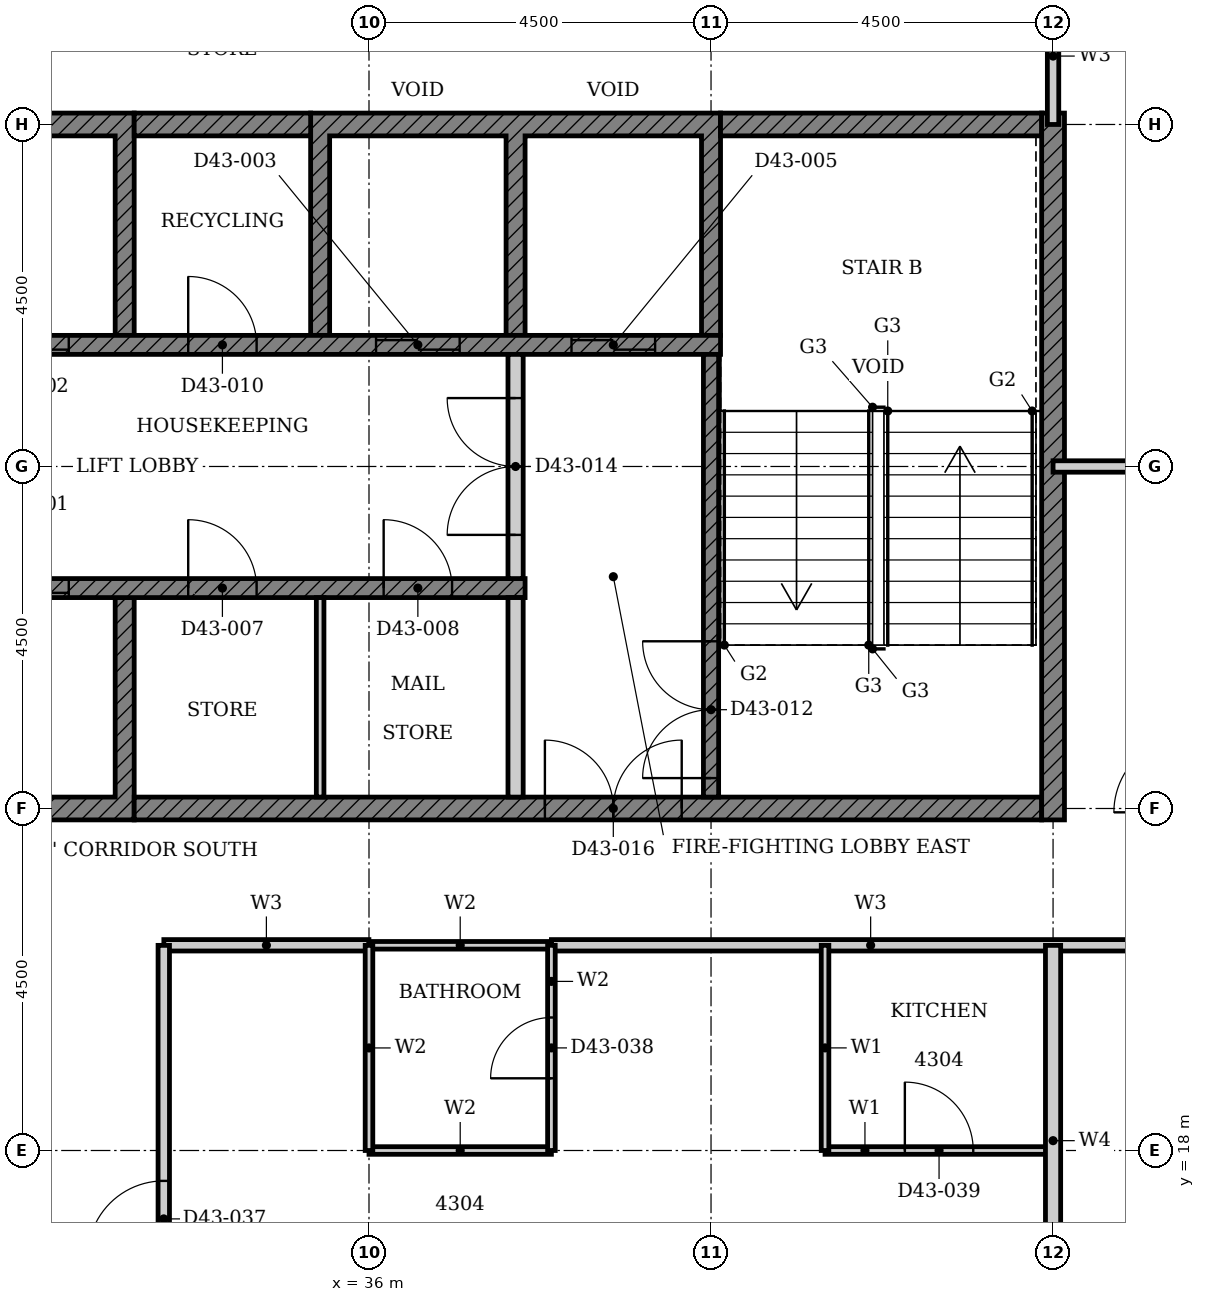
"""IFC4 building model, lengths in metres.
Left out: names, types, materials, properties, quantities, classifications, styles, units other than length and angle.
Written with IfcOpenShell. Run it as: python <this file> out.ifc"""

import sys

from ifc_helpers import new_model, si_unit, direction, frame, frame_2d, origin, place, context, subcontext, project, spatial, polyline, rectangle, outline, extrude, element, fill, save


model = new_model("IFC4")
c1 = context("Model", 3, precision=1e-05, world=origin(), true_north=direction((0.0, 1.0)))
c2 = subcontext(c1, "Body", "Model", "MODEL_VIEW")
j1 = project(units=[si_unit("LENGTHUNIT", "METRE"), si_unit("PLANEANGLEUNIT", "RADIAN")], contexts=[c1])
p1 = place(None, origin())
s1 = spatial("IfcSite", under=j1, at=p1, CompositionType="ELEMENT")
p2 = place(p1, origin())
s2 = spatial("IfcBuilding", under=s1, at=p2, CompositionType="ELEMENT")
p3 = place(p2, frame((0.0, 0.0, 172.8)))
s3 = spatial("IfcBuildingStorey", under=s2, at=p3, CompositionType="ELEMENT", Elevation=172.8)
p4 = place(p3, origin())
e1 = element("IfcWall", 1, at=p4, inside=s3, PredefinedType="SHEAR", context=c2, shape_type="SweptSolid", body=[
    extrude(outline(polyline([(27.518, 22.35), (32.911, 22.35), (32.911, 25.275), (32.661, 25.275), (32.661, 22.65), (30.339, 22.65), (30.339, 25.275), (30.089, 25.275), (30.089, 22.65), (27.768, 22.65), (27.768, 25.275), (27.518, 25.275), (27.518, 22.35)])), origin(), (0.0, 0.0, 1.0), 3.4),
])
p5 = place(p3, origin())
e2 = element("IfcWall", 2, at=p5, inside=s3, PredefinedType="SHEAR", context=c2, shape_type="SweptSolid", body=[
    extrude(outline(polyline([(27.518, 28.725), (27.768, 28.725), (27.768, 31.35), (30.089, 31.35), (30.089, 28.725), (30.339, 28.725), (30.339, 31.35), (32.661, 31.35), (32.661, 28.725), (32.911, 28.725), (32.911, 31.65), (27.518, 31.65), (27.518, 28.725)])), origin(), (0.0, 0.0, 1.0), 3.4),
])
p6 = place(p3, origin())
e3 = element("IfcWall", 3, at=p6, inside=s3, PredefinedType="SHEAR", context=c2, shape_type="SweptSolid", body=[
    extrude(outline(polyline([(35.232, 28.725), (35.482, 28.725), (35.482, 31.35), (37.803, 31.35), (37.803, 28.725), (38.053, 28.725), (38.053, 31.35), (40.375, 31.35), (40.375, 28.725), (40.625, 28.725), (40.625, 31.65), (35.232, 31.65), (35.232, 28.725)])), origin(), (0.0, 0.0, 1.0), 3.4),
])
p7 = place(p3, frame((32.911, 22.5, 0.0), z_axis=(0.0, 0.0, 1.0), x_axis=(1.0, 0.0, 0.0)))
e4 = element("IfcWall", 4, at=p7, inside=s3, PredefinedType="SHEAR", context=c2, shape_type="SweptSolid", body=[
    extrude(rectangle(XDim=11.939, YDim=0.3, at=frame_2d((5.97, 0.0))), origin(), (0.0, 0.0, 1.0), 3.4),
])
p8 = place(p7, frame((5.404, 0.0, 0.0)))
e5 = element("IfcOpeningElement", 5, at=p8, cuts=e4, PredefinedType="OPENING", context=c2, shape_type="SweptSolid", body=[
    extrude(rectangle(XDim=1.8, YDim=2.1, at=frame_2d((0.9, 1.05))), frame((0.0, 0.16, 0.0), z_axis=(0.0, -1.0, 0.0), x_axis=(1.0, 0.0, 0.0)), (0.0, 0.0, 1.0), 0.32),
])
p9 = place(p3, frame((32.911, 31.5, 0.0), z_axis=(0.0, 0.0, 1.0), x_axis=(1.0, 0.0, 0.0)))
e6 = element("IfcWall", 6, at=p9, inside=s3, PredefinedType="SHEAR", context=c2, shape_type="SweptSolid", body=[
    extrude(rectangle(XDim=2.322, YDim=0.3, at=frame_2d((1.161, 0.0))), origin(), (0.0, 0.0, 1.0), 3.4),
])
p10 = place(p3, frame((40.625, 31.5, 0.0), z_axis=(0.0, 0.0, 1.0), x_axis=(1.0, 0.0, 0.0)))
e7 = element("IfcWall", 7, at=p10, inside=s3, PredefinedType="SHEAR", context=c2, shape_type="SweptSolid", body=[
    extrude(rectangle(XDim=4.225, YDim=0.3, at=frame_2d((2.113, 0.0))), origin(), (0.0, 0.0, 1.0), 3.4),
])
p11 = place(p3, frame((45.0, 22.35, 0.0), z_axis=(0.0, 0.0, 1.0), x_axis=(0.0, 1.0, 0.0)))
e8 = element("IfcWall", 8, at=p11, inside=s3, PredefinedType="SHEAR", context=c2, shape_type="SweptSolid", body=[
    extrude(rectangle(XDim=9.3, YDim=0.3, at=frame_2d((4.65, 0.0))), origin(), (0.0, 0.0, 1.0), 3.4),
])
p12 = place(p3, frame((22.375, 25.4, 0.0), z_axis=(0.0, 0.0, 1.0), x_axis=(1.0, 0.0, 0.0)))
e9 = element("IfcWall", 9, at=p12, inside=s3, PredefinedType="SHEAR", context=c2, shape_type="SweptSolid", body=[
    extrude(rectangle(XDim=15.678, YDim=0.25, at=frame_2d((7.839, 0.0))), origin(), (0.0, 0.0, 1.0), 3.4),
])
p13 = place(p12, frame((8.575, 0.0, 0.0)))
e10 = element("IfcOpeningElement", 10, at=p13, cuts=e9, PredefinedType="OPENING", context=c2, shape_type="SweptSolid", body=[
    extrude(rectangle(XDim=1.1, YDim=2.1, at=frame_2d((0.55, 1.05))), frame((0.0, 0.135, 0.0), z_axis=(0.0, -1.0, 0.0), x_axis=(1.0, 0.0, 0.0)), (0.0, 0.0, 1.0), 0.27),
])
p14 = place(p12, frame((0.861, 0.0, 0.0)))
e11 = element("IfcOpeningElement", 11, at=p14, cuts=e9, PredefinedType="OPENING", context=c2, shape_type="SweptSolid", body=[
    extrude(rectangle(XDim=1.1, YDim=2.1, at=frame_2d((0.55, 1.05))), frame((0.0, 0.135, 0.0), z_axis=(0.0, -1.0, 0.0), x_axis=(1.0, 0.0, 0.0)), (0.0, 0.0, 1.0), 0.27),
])
p15 = place(p12, frame((3.532, 0.0, 0.0)))
e12 = element("IfcOpeningElement", 12, at=p15, cuts=e9, PredefinedType="OPENING", context=c2, shape_type="SweptSolid", body=[
    extrude(rectangle(XDim=0.9, YDim=2.1, at=frame_2d((0.45, 1.05))), frame((0.0, 0.135, 0.0), z_axis=(0.0, -1.0, 0.0), x_axis=(1.0, 0.0, 0.0)), (0.0, 0.0, 1.0), 0.27),
])
p16 = place(p12, frame((11.246, 0.0, 0.0)))
e13 = element("IfcOpeningElement", 13, at=p16, cuts=e9, PredefinedType="OPENING", context=c2, shape_type="SweptSolid", body=[
    extrude(rectangle(XDim=0.9, YDim=2.1, at=frame_2d((0.45, 1.05))), frame((0.0, 0.135, 0.0), z_axis=(0.0, -1.0, 0.0), x_axis=(1.0, 0.0, 0.0)), (0.0, 0.0, 1.0), 0.27),
])
p17 = place(p12, frame((13.818, 0.0, 0.0)))
e14 = element("IfcOpeningElement", 14, at=p17, cuts=e9, PredefinedType="OPENING", context=c2, shape_type="SweptSolid", body=[
    extrude(rectangle(XDim=0.9, YDim=2.1, at=frame_2d((0.45, 1.05))), frame((0.0, 0.135, 0.0), z_axis=(0.0, -1.0, 0.0), x_axis=(1.0, 0.0, 0.0)), (0.0, 0.0, 1.0), 0.27),
])
p18 = place(p3, frame((24.947, 28.6, 0.0), z_axis=(0.0, 0.0, 1.0), x_axis=(1.0, 0.0, 0.0)))
e15 = element("IfcWall", 15, at=p18, inside=s3, PredefinedType="SHEAR", context=c2, shape_type="SweptSolid", body=[
    extrude(rectangle(XDim=15.678, YDim=0.25, at=frame_2d((7.839, 0.0))), origin(), (0.0, 0.0, 1.0), 3.4),
])
p19 = place(p18, frame((6.004, 0.0, 0.0)))
e16 = element("IfcOpeningElement", 16, at=p19, cuts=e15, PredefinedType="OPENING", context=c2, shape_type="SweptSolid", body=[
    extrude(rectangle(XDim=1.1, YDim=2.1, at=frame_2d((0.55, 1.05))), frame((0.0, 0.135, 0.0), z_axis=(0.0, -1.0, 0.0), x_axis=(1.0, 0.0, 0.0)), (0.0, 0.0, 1.0), 0.27),
])
p20 = place(p18, frame((11.146, 0.0, 0.0)))
e17 = element("IfcOpeningElement", 17, at=p20, cuts=e15, PredefinedType="OPENING", context=c2, shape_type="SweptSolid", body=[
    extrude(rectangle(XDim=1.1, YDim=2.1, at=frame_2d((0.55, 1.05))), frame((0.0, 0.135, 0.0), z_axis=(0.0, -1.0, 0.0), x_axis=(1.0, 0.0, 0.0)), (0.0, 0.0, 1.0), 0.27),
])
p21 = place(p18, frame((13.718, 0.0, 0.0)))
e18 = element("IfcOpeningElement", 18, at=p21, cuts=e15, PredefinedType="OPENING", context=c2, shape_type="SweptSolid", body=[
    extrude(rectangle(XDim=1.1, YDim=2.1, at=frame_2d((0.55, 1.05))), frame((0.0, 0.135, 0.0), z_axis=(0.0, -1.0, 0.0), x_axis=(1.0, 0.0, 0.0)), (0.0, 0.0, 1.0), 0.27),
])
p22 = place(p18, frame((0.961, 0.0, 0.0)))
e19 = element("IfcOpeningElement", 19, at=p22, cuts=e15, PredefinedType="OPENING", context=c2, shape_type="SweptSolid", body=[
    extrude(rectangle(XDim=0.9, YDim=2.1, at=frame_2d((0.45, 1.05))), frame((0.0, 0.135, 0.0), z_axis=(0.0, -1.0, 0.0), x_axis=(1.0, 0.0, 0.0)), (0.0, 0.0, 1.0), 0.27),
])
p23 = place(p18, frame((8.675, 0.0, 0.0)))
e20 = element("IfcOpeningElement", 20, at=p23, cuts=e15, PredefinedType="OPENING", context=c2, shape_type="SweptSolid", body=[
    extrude(rectangle(XDim=0.9, YDim=2.1, at=frame_2d((0.45, 1.05))), frame((0.0, 0.135, 0.0), z_axis=(0.0, -1.0, 0.0), x_axis=(1.0, 0.0, 0.0)), (0.0, 0.0, 1.0), 0.27),
])
p24 = place(p3, frame((37.928, 22.65, 0.0), z_axis=(0.0, 0.0, 1.0), x_axis=(0.0, 1.0, 0.0)))
e21 = element("IfcWall", 21, at=p24, inside=s3, PredefinedType="PARTITIONING", context=c2, shape_type="SweptSolid", body=[
    extrude(rectangle(XDim=2.625, YDim=0.2, at=frame_2d((1.312, 0.0))), origin(), (0.0, 0.0, 1.0), 3.4),
])
p25 = place(p3, frame((35.357, 22.65, 0.0), z_axis=(0.0, 0.0, 1.0), x_axis=(0.0, 1.0, 0.0)))
e22 = element("IfcWall", 22, at=p25, inside=s3, PredefinedType="PARTITIONING", context=c2, shape_type="SweptSolid", body=[
    extrude(rectangle(XDim=2.625, YDim=0.1, at=frame_2d((1.312, 0.0))), origin(), (0.0, 0.0, 1.0), 3.4),
])
p26 = place(p3, frame((40.5, 22.65, 0.0), z_axis=(0.0, 0.0, 1.0), x_axis=(0.0, 1.0, 0.0)))
e23 = element("IfcWall", 23, at=p26, inside=s3, PredefinedType="SHEAR", context=c2, shape_type="SweptSolid", body=[
    extrude(rectangle(XDim=5.825, YDim=0.2, at=frame_2d((2.913, 0.0))), origin(), (0.0, 0.0, 1.0), 3.4),
])
p27 = place(p26, frame((0.25, 0.0, 0.0)))
e24 = element("IfcOpeningElement", 24, at=p27, cuts=e23, PredefinedType="OPENING", context=c2, shape_type="SweptSolid", body=[
    extrude(rectangle(XDim=1.8, YDim=2.1, at=frame_2d((0.9, 1.05))), frame((0.0, 0.11, 0.0), z_axis=(0.0, -1.0, 0.0), x_axis=(1.0, 0.0, 0.0)), (0.0, 0.0, 1.0), 0.22),
])
p28 = place(p3, frame((37.928, 25.525, 0.0), z_axis=(0.0, 0.0, 1.0), x_axis=(0.0, 1.0, 0.0)))
e25 = element("IfcWall", 25, at=p28, inside=s3, PredefinedType="PARTITIONING", context=c2, shape_type="SweptSolid", body=[
    extrude(rectangle(XDim=2.95, YDim=0.2, at=frame_2d((1.475, 0.0))), origin(), (0.0, 0.0, 1.0), 3.4),
])
p29 = place(p28, frame((0.575, 0.0, 0.0)))
e26 = element("IfcOpeningElement", 26, at=p29, cuts=e25, PredefinedType="OPENING", context=c2, shape_type="SweptSolid", body=[
    extrude(rectangle(XDim=1.8, YDim=2.1, at=frame_2d((0.9, 1.05))), frame((0.0, 0.11, 0.0), z_axis=(0.0, -1.0, 0.0), x_axis=(1.0, 0.0, 0.0)), (0.0, 0.0, 1.0), 0.22),
])
p30 = place(p3, frame((33.301, 20.7, 0.0), z_axis=(0.0, 0.0, 1.0), x_axis=(1.0, 0.0, 0.0)))
e27 = element("IfcWall", 27, at=p30, inside=s3, PredefinedType="PARTITIONING", context=c2, shape_type="SweptSolid", body=[
    extrude(rectangle(XDim=2.698, YDim=0.15, at=frame_2d((1.349, 0.0))), origin(), (0.0, 0.0, 1.0), 3.4),
])
p31 = place(p3, frame((38.4, 20.7, 0.0), z_axis=(0.0, 0.0, 1.0), x_axis=(1.0, 0.0, 0.0)))
e28 = element("IfcWall", 28, at=p31, inside=s3, PredefinedType="PARTITIONING", context=c2, shape_type="SweptSolid", body=[
    extrude(rectangle(XDim=8.4, YDim=0.15, at=frame_2d((4.2, 0.0))), origin(), (0.0, 0.0, 1.0), 3.4),
])
p32 = place(p3, frame((45.0, 27.0, 0.0), z_axis=(0.0, 0.0, 1.0), x_axis=(1.0, 0.0, 0.0)))
e29 = element("IfcWall", 29, at=p32, inside=s3, PredefinedType="PARTITIONING", context=c2, shape_type="SweptSolid", body=[
    extrude(rectangle(XDim=13.5, YDim=0.15, at=frame_2d((6.75, 0.0))), origin(), (0.0, 0.0, 1.0), 2.68),
])
p33 = place(p32, frame((7.15, 0.0, 0.0)))
e30 = element("IfcOpeningElement", 30, at=p33, cuts=e29, PredefinedType="OPENING", context=c2, shape_type="SweptSolid", body=[
    extrude(rectangle(XDim=1.0, YDim=2.1, at=frame_2d((0.5, 1.05))), frame((0.0, 0.085, 0.0), z_axis=(0.0, -1.0, 0.0), x_axis=(1.0, 0.0, 0.0)), (0.0, 0.0, 1.0), 0.17),
])
p34 = place(p3, frame((33.3, 13.501, 0.0), z_axis=(0.0, 0.0, 1.0), x_axis=(0.0, 1.0, 0.0)))
e31 = element("IfcWall", 31, at=p34, inside=s3, PredefinedType="PARTITIONING", context=c2, shape_type="SweptSolid", body=[
    extrude(rectangle(XDim=7.198, YDim=0.15, at=frame_2d((3.599, 0.0))), origin(), (0.0, 0.0, 1.0), 3.4),
])
p35 = place(p34, frame((3.099, 0.0, 0.0)))
e32 = element("IfcOpeningElement", 32, at=p35, cuts=e31, PredefinedType="OPENING", context=c2, shape_type="SweptSolid", body=[
    extrude(rectangle(XDim=1.0, YDim=2.2, at=frame_2d((0.5, 1.1))), frame((0.0, 0.085, 0.0), z_axis=(0.0, -1.0, 0.0), x_axis=(1.0, 0.0, 0.0)), (0.0, 0.0, 1.0), 0.17),
])
p36 = place(p3, frame((45.0, 31.5, 0.0), z_axis=(0.0, 0.0, 1.0), x_axis=(0.0, 1.0, 0.0)))
e33 = element("IfcWall", 33, at=p36, inside=s3, PredefinedType="PARTITIONING", context=c2, shape_type="SweptSolid", body=[
    extrude(rectangle(XDim=1.8, YDim=0.15, at=frame_2d((0.9, 0.0))), origin(), (0.0, 0.0, 1.0), 3.4),
])
p37 = place(p3, frame((42.0, 18.0, 0.0), z_axis=(0.0, 0.0, 1.0), x_axis=(1.0, 0.0, 0.0)))
e34 = element("IfcWall", 34, at=p37, inside=s3, PredefinedType="PARTITIONING", context=c2, shape_type="SweptSolid", body=[
    extrude(rectangle(XDim=3.0, YDim=0.1, at=frame_2d((1.5, 0.0))), origin(), (0.0, 0.0, 1.0), 3.4),
])
p38 = place(p37, frame((1.05, 0.0, 0.0)))
e35 = element("IfcOpeningElement", 35, at=p38, cuts=e34, PredefinedType="OPENING", context=c2, shape_type="SweptSolid", body=[
    extrude(rectangle(XDim=0.9, YDim=2.1, at=frame_2d((0.45, 1.05))), frame((0.0, 0.06, 0.0), z_axis=(0.0, -1.0, 0.0), x_axis=(1.0, 0.0, 0.0)), (0.0, 0.0, 1.0), 0.12),
])
p39 = place(p3, frame((42.0, 18.0, 0.0), z_axis=(0.0, 0.0, 1.0), x_axis=(0.0, 1.0, 0.0)))
e36 = element("IfcWall", 36, at=p39, inside=s3, PredefinedType="PARTITIONING", context=c2, shape_type="SweptSolid", body=[
    extrude(rectangle(XDim=2.7, YDim=0.1, at=frame_2d((1.35, 0.0))), origin(), (0.0, 0.0, 1.0), 3.4),
])
p40 = place(p3, frame((45.0, 15.56, 0.0), z_axis=(0.0, 0.0, 1.0), x_axis=(0.0, 1.0, 0.0)))
e37 = element("IfcWall", 37, at=p40, inside=s3, PredefinedType="PARTITIONING", context=c2, shape_type="SweptSolid", body=[
    extrude(rectangle(XDim=5.139, YDim=0.2, at=frame_2d((2.569, 0.0))), origin(), (0.0, 0.0, 1.0), 3.4),
])
for number, where, z_axis, x_axis in (
    (38, (36.0, 18.0, 0.0), (0.0, 0.0, 1.0), (1.0, 0.0, 0.0)),
    (39, (36.0, 20.7, 0.0), (0.0, 0.0, 1.0), (1.0, 0.0, 0.0)),
):
    element("IfcWall", number, at=place(p3, frame(where, z_axis=z_axis, x_axis=x_axis)), inside=s3, PredefinedType="PARTITIONING", context=c2, shape_type="SweptSolid", body=[
        extrude(rectangle(XDim=2.4, YDim=0.1, at=frame_2d((1.2, 0.0))), origin(), (0.0, 0.0, 1.0), 3.4),
    ])
p41 = place(p3, frame((36.0, 18.0, 0.0), z_axis=(0.0, 0.0, 1.0), x_axis=(0.0, 1.0, 0.0)))
e40 = element("IfcWall", 40, at=p41, inside=s3, PredefinedType="PARTITIONING", context=c2, shape_type="SweptSolid", body=[
    extrude(rectangle(XDim=2.699, YDim=0.1, at=frame_2d((1.35, 0.0))), origin(), (0.0, 0.0, 1.0), 3.4),
])
p42 = place(p3, frame((38.4, 18.0, 0.0), z_axis=(0.0, 0.0, 1.0), x_axis=(0.0, 1.0, 0.0)))
e41 = element("IfcWall", 41, at=p42, inside=s3, PredefinedType="PARTITIONING", context=c2, shape_type="SweptSolid", body=[
    extrude(rectangle(XDim=2.7, YDim=0.1, at=frame_2d((1.35, 0.0))), origin(), (0.0, 0.0, 1.0), 3.4),
])
p43 = place(p42, frame((0.95, 0.0, 0.0)))
e42 = element("IfcOpeningElement", 42, at=p43, cuts=e41, PredefinedType="OPENING", context=c2, shape_type="SweptSolid", body=[
    extrude(rectangle(XDim=0.8, YDim=2.1, at=frame_2d((0.4, 1.05))), frame((0.0, 0.06, 0.0), z_axis=(0.0, -1.0, 0.0), x_axis=(1.0, 0.0, 0.0)), (0.0, 0.0, 1.0), 0.12),
])
p44 = place(p13, origin())
e43 = element("IfcDoor", 43, at=p44, inside=s3, OperationType="DOUBLE_DOOR_SLIDING", PredefinedType="DOOR", context=c2, shape_type="SweptSolid", body=[
    extrude(rectangle(XDim=1.1, YDim=2.1, at=frame_2d((0.55, 1.05))), frame((0.0, 0.025, 0.0), z_axis=(0.0, -1.0, 0.0), x_axis=(1.0, 0.0, 0.0)), (0.0, 0.0, 1.0), 0.05),
])
fill(e10, e43)
p45 = place(p19, origin())
e44 = element("IfcDoor", 44, at=p45, inside=s3, OperationType="DOUBLE_DOOR_SLIDING", PredefinedType="DOOR", context=c2, shape_type="SweptSolid", body=[
    extrude(rectangle(XDim=1.1, YDim=2.1, at=frame_2d((0.55, 1.05))), frame((0.0, 0.025, 0.0), z_axis=(0.0, -1.0, 0.0), x_axis=(1.0, 0.0, 0.0)), (0.0, 0.0, 1.0), 0.05),
])
fill(e16, e44)
p46 = place(p20, origin())
e45 = element("IfcDoor", 45, at=p46, inside=s3, OperationType="DOUBLE_DOOR_SLIDING", PredefinedType="DOOR", context=c2, shape_type="SweptSolid", body=[
    extrude(rectangle(XDim=1.1, YDim=2.1, at=frame_2d((0.55, 1.05))), frame((0.0, 0.025, 0.0), z_axis=(0.0, -1.0, 0.0), x_axis=(1.0, 0.0, 0.0)), (0.0, 0.0, 1.0), 0.05),
])
fill(e17, e45)
p47 = place(p21, origin())
e46 = element("IfcDoor", 46, at=p47, inside=s3, OperationType="DOUBLE_DOOR_SLIDING", PredefinedType="DOOR", context=c2, shape_type="SweptSolid", body=[
    extrude(rectangle(XDim=1.1, YDim=2.1, at=frame_2d((0.55, 1.05))), frame((0.0, 0.025, 0.0), z_axis=(0.0, -1.0, 0.0), x_axis=(1.0, 0.0, 0.0)), (0.0, 0.0, 1.0), 0.05),
])
fill(e18, e46)
p48 = place(p16, origin())
e47 = element("IfcDoor", 47, at=p48, inside=s3, OperationType="SINGLE_SWING_LEFT", PredefinedType="DOOR", context=c2, shape_type="SweptSolid", body=[
    extrude(rectangle(XDim=0.9, YDim=2.1, at=frame_2d((0.45, 1.05))), frame((0.0, 0.025, 0.0), z_axis=(0.0, -1.0, 0.0), x_axis=(1.0, 0.0, 0.0)), (0.0, 0.0, 1.0), 0.05),
])
fill(e13, e47)
p49 = place(p17, origin())
e48 = element("IfcDoor", 48, at=p49, inside=s3, OperationType="SINGLE_SWING_LEFT", PredefinedType="DOOR", context=c2, shape_type="SweptSolid", body=[
    extrude(rectangle(XDim=0.9, YDim=2.1, at=frame_2d((0.45, 1.05))), frame((0.0, 0.025, 0.0), z_axis=(0.0, -1.0, 0.0), x_axis=(1.0, 0.0, 0.0)), (0.0, 0.0, 1.0), 0.05),
])
fill(e14, e48)
p50 = place(p23, origin())
e49 = element("IfcDoor", 49, at=p50, inside=s3, OperationType="SINGLE_SWING_LEFT", PredefinedType="DOOR", context=c2, shape_type="SweptSolid", body=[
    extrude(rectangle(XDim=0.9, YDim=2.1, at=frame_2d((0.45, 1.05))), frame((0.0, 0.025, 0.0), z_axis=(0.0, -1.0, 0.0), x_axis=(1.0, 0.0, 0.0)), (0.0, 0.0, 1.0), 0.05),
])
fill(e20, e49)
p51 = place(p27, origin())
e50 = element("IfcDoor", 50, at=p51, inside=s3, OperationType="DOUBLE_DOOR_SINGLE_SWING", PredefinedType="DOOR", context=c2, shape_type="SweptSolid", body=[
    extrude(rectangle(XDim=1.8, YDim=2.1, at=frame_2d((0.9, 1.05))), frame((0.0, 0.025, 0.0), z_axis=(0.0, -1.0, 0.0), x_axis=(1.0, 0.0, 0.0)), (0.0, 0.0, 1.0), 0.05),
])
fill(e24, e50)
p52 = place(p29, origin())
e51 = element("IfcDoor", 51, at=p52, inside=s3, OperationType="DOUBLE_DOOR_SINGLE_SWING", PredefinedType="DOOR", context=c2, shape_type="SweptSolid", body=[
    extrude(rectangle(XDim=1.8, YDim=2.1, at=frame_2d((0.9, 1.05))), frame((0.0, 0.025, 0.0), z_axis=(0.0, -1.0, 0.0), x_axis=(1.0, 0.0, 0.0)), (0.0, 0.0, 1.0), 0.05),
])
fill(e26, e51)
p53 = place(p8, origin())
e52 = element("IfcDoor", 52, at=p53, inside=s3, OperationType="DOUBLE_DOOR_SINGLE_SWING", PredefinedType="DOOR", context=c2, shape_type="SweptSolid", body=[
    extrude(rectangle(XDim=1.8, YDim=2.1, at=frame_2d((0.9, 1.05))), frame((0.0, 0.025, 0.0), z_axis=(0.0, -1.0, 0.0), x_axis=(1.0, 0.0, 0.0)), (0.0, 0.0, 1.0), 0.05),
])
fill(e5, e52)
p54 = place(p35, origin())
e53 = element("IfcDoor", 53, at=p54, inside=s3, OperationType="SINGLE_SWING_LEFT", PredefinedType="DOOR", context=c2, shape_type="SweptSolid", body=[
    extrude(rectangle(XDim=1.0, YDim=2.2, at=frame_2d((0.5, 1.1))), frame((0.0, 0.025, 0.0), z_axis=(0.0, -1.0, 0.0), x_axis=(1.0, 0.0, 0.0)), (0.0, 0.0, 1.0), 0.05),
])
fill(e32, e53)
p55 = place(p43, origin())
e54 = element("IfcDoor", 54, at=p55, inside=s3, OperationType="SINGLE_SWING_LEFT", PredefinedType="DOOR", context=c2, shape_type="SweptSolid", body=[
    extrude(rectangle(XDim=0.8, YDim=2.1, at=frame_2d((0.4, 1.05))), frame((0.0, 0.025, 0.0), z_axis=(0.0, -1.0, 0.0), x_axis=(1.0, 0.0, 0.0)), (0.0, 0.0, 1.0), 0.05),
])
fill(e42, e54)
p56 = place(p38, origin())
e55 = element("IfcDoor", 55, at=p56, inside=s3, OperationType="SINGLE_SWING_RIGHT", PredefinedType="DOOR", context=c2, shape_type="SweptSolid", body=[
    extrude(rectangle(XDim=0.9, YDim=2.1, at=frame_2d((0.45, 1.05))), frame((0.0, 0.025, 0.0), z_axis=(0.0, -1.0, 0.0), x_axis=(1.0, 0.0, 0.0)), (0.0, 0.0, 1.0), 0.05),
])
fill(e35, e55)
save(model, sys.argv[1])
